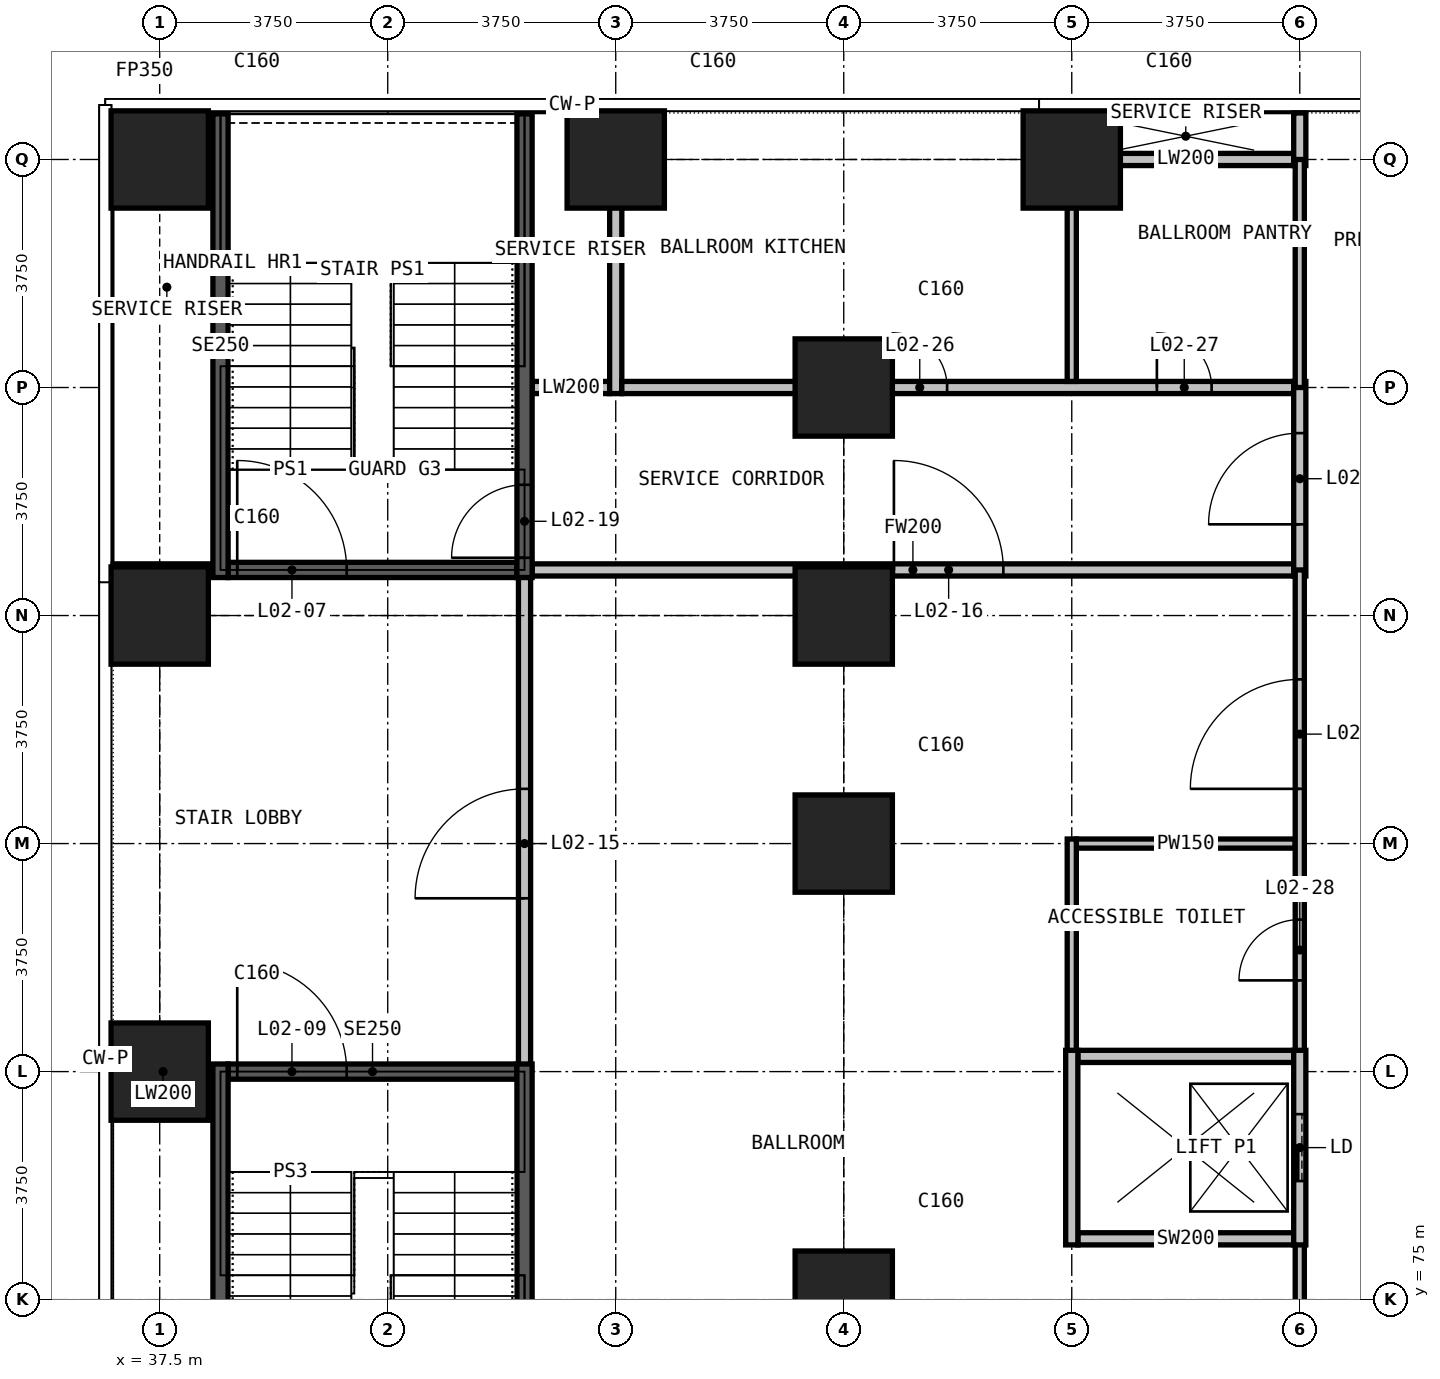
"""IFC4 building model, lengths in metres.
Left out: names, types, materials, properties, quantities, classifications, styles, units other than length and angle.
Written with IfcOpenShell. Run it as: python <this file> out.ifc"""

import sys

from ifc_helpers import new_model, si_unit, direction, frame, frame_2d, origin, origin_2d, place, context, subcontext, project, spatial, rectangle, extrude, element, fill, save


model = new_model("IFC4")
c1 = context("Model", 3, precision=1e-05, world=origin(), true_north=direction((0.0, 1.0)))
c2 = subcontext(c1, "Body", "Model", "MODEL_VIEW")
j1 = project(units=[si_unit("LENGTHUNIT", "METRE"), si_unit("PLANEANGLEUNIT", "RADIAN")], contexts=[c1])
p1 = place(None, origin())
s1 = spatial("IfcSite", under=j1, at=p1, CompositionType="ELEMENT")
p2 = place(p1, origin())
s2 = spatial("IfcBuilding", under=s1, at=p2, CompositionType="ELEMENT")
p3 = place(p2, frame((0.0, 0.0, 16.5)))
s3 = spatial("IfcBuildingStorey", under=s2, at=p3, CompositionType="ELEMENT", Elevation=16.5)
for number, where, z_axis, x_axis in (
    (1, (37.5, 78.75, 0.0), (0.0, 0.0, 1.0), (1.0, 0.0, 0.0)),
    (2, (37.5, 86.25, 0.0), (0.0, 0.0, 1.0), (1.0, 0.0, 0.0)),
    (3, (37.5, 93.75, 0.0), (0.0, 0.0, 1.0), (1.0, 0.0, 0.0)),
    (4, (45.0, 93.75, 0.0), (0.0, 0.0, 1.0), (1.0, 0.0, 0.0)),
    (5, (48.75, 75.0, 0.0), (0.0, 0.0, 1.0), (1.0, 0.0, 0.0)),
    (6, (48.75, 82.5, 0.0), (0.0, 0.0, 1.0), (1.0, 0.0, 0.0)),
    (7, (48.75, 86.25, 0.0), (0.0, 0.0, 1.0), (1.0, 0.0, 0.0)),
    (8, (48.75, 90.0, 0.0), (0.0, 0.0, 1.0), (1.0, 0.0, 0.0)),
    (9, (52.5, 93.75, 0.0), (0.0, 0.0, 1.0), (1.0, 0.0, 0.0)),
):
    element("IfcColumn", number, at=place(p3, frame(where, z_axis=z_axis, x_axis=x_axis)), inside=s3, PredefinedType="COLUMN", context=c2, shape_type="SweptSolid", body=[
        extrude(rectangle(XDim=1.6, YDim=1.6, at=origin_2d()), origin(), (0.0, 0.0, 1.0), 7.5),
    ])
for number, where, z_axis, x_axis in (
    (10, (36.735, 78.75, 0.0), (0.0, 0.0, 1.0), (1.0, 0.0, 0.0)),
    (11, (36.735, 87.0, 0.0), (0.0, 0.0, 1.0), (1.0, 0.0, 0.0)),
):
    element("IfcWall", number, at=place(p3, frame(where, z_axis=z_axis, x_axis=x_axis)), inside=s3, PredefinedType="PARTITIONING", context=c2, shape_type="SweptSolid", body=[
        extrude(rectangle(XDim=1.64, YDim=0.2, at=frame_2d((0.82, 0.0))), origin(), (0.0, 0.0, 1.0), 7.15),
    ])
p4 = place(p3, frame((43.625, 90.0, 0.0), z_axis=(0.0, 0.0, 1.0), x_axis=(1.0, 0.0, 0.0)))
e12 = element("IfcWall", 12, at=p4, inside=s3, PredefinedType="PARTITIONING", context=c2, shape_type="SweptSolid", body=[
    extrude(rectangle(XDim=1.275, YDim=0.2, at=frame_2d((0.637, 0.0))), origin(), (0.0, 0.0, 1.0), 7.15),
])
p5 = place(p3, frame((52.6, 93.75, 0.0), z_axis=(0.0, 0.0, 1.0), x_axis=(1.0, 0.0, 0.0)))
e13 = element("IfcWall", 13, at=p5, inside=s3, PredefinedType="PARTITIONING", context=c2, shape_type="SweptSolid", body=[
    extrude(rectangle(XDim=3.55, YDim=0.2, at=frame_2d((1.775, 0.0))), origin(), (0.0, 0.0, 1.0), 7.15),
])
p6 = place(p3, frame((43.5, 78.625, 0.0), z_axis=(0.0, 0.0, 1.0), x_axis=(0.0, 1.0, 0.0)))
e14 = element("IfcWall", 14, at=p6, inside=s3, PredefinedType="PARTITIONING", context=c2, shape_type="SweptSolid", body=[
    extrude(rectangle(XDim=8.5, YDim=0.2, at=frame_2d((4.25, 0.0))), origin(), (0.0, 0.0, 1.0), 7.15),
])
p7 = place(p6, frame((2.975, 0.0, 0.0)))
e15 = element("IfcOpeningElement", 15, at=p7, cuts=e14, PredefinedType="OPENING", context=c2, shape_type="SweptSolid", body=[
    extrude(rectangle(XDim=1.8, YDim=2.2, at=frame_2d((0.9, 1.1))), frame((0.0, 0.11, 0.0), z_axis=(0.0, -1.0, 0.0), x_axis=(1.0, 0.0, 0.0)), (0.0, 0.0, 1.0), 0.22),
])
p8 = place(p3, frame((45.0, 89.9, 0.0), z_axis=(0.0, 0.0, 1.0), x_axis=(0.0, 1.0, 0.0)))
e16 = element("IfcWall", 16, at=p8, inside=s3, PredefinedType="PARTITIONING", context=c2, shape_type="SweptSolid", body=[
    extrude(rectangle(XDim=4.615, YDim=0.2, at=frame_2d((2.308, 0.0))), origin(), (0.0, 0.0, 1.0), 7.15),
])
for number, where, z_axis, x_axis in (
    (17, (52.5, 93.65, 0.0), (0.0, 0.0, 1.0), (0.0, 1.0, 0.0)),
    (18, (56.25, 93.65, 0.0), (0.0, 0.0, 1.0), (0.0, 1.0, 0.0)),
):
    element("IfcWall", number, at=place(p3, frame(where, z_axis=z_axis, x_axis=x_axis)), inside=s3, PredefinedType="PARTITIONING", context=c2, shape_type="SweptSolid", body=[
        extrude(rectangle(XDim=0.865, YDim=0.2, at=frame_2d((0.433, 0.0))), origin(), (0.0, 0.0, 1.0), 7.15),
    ])
p9 = place(p3, frame((43.625, 87.0, 0.0), z_axis=(0.0, 0.0, 1.0), x_axis=(1.0, 0.0, 0.0)))
e19 = element("IfcWall", 19, at=p9, inside=s3, PredefinedType="PARTITIONING", context=c2, shape_type="SweptSolid", body=[
    extrude(rectangle(XDim=12.525, YDim=0.2, at=frame_2d((6.262, 0.0))), origin(), (0.0, 0.0, 1.0), 7.15),
])
p10 = place(p9, frame((5.95, 0.0, 0.0)))
e20 = element("IfcOpeningElement", 20, at=p10, cuts=e19, PredefinedType="OPENING", context=c2, shape_type="SweptSolid", body=[
    extrude(rectangle(XDim=1.8, YDim=2.2, at=frame_2d((0.9, 1.1))), frame((0.0, 0.11, 0.0), z_axis=(0.0, -1.0, 0.0), x_axis=(1.0, 0.0, 0.0)), (0.0, 0.0, 1.0), 0.22),
])
p11 = place(p3, frame((45.1, 90.0, 0.0), z_axis=(0.0, 0.0, 1.0), x_axis=(1.0, 0.0, 0.0)))
e21 = element("IfcWall", 21, at=p11, inside=s3, PredefinedType="PARTITIONING", context=c2, shape_type="SweptSolid", body=[
    extrude(rectangle(XDim=11.05, YDim=0.2, at=frame_2d((5.525, 0.0))), origin(), (0.0, 0.0, 1.0), 7.15),
])
p12 = place(p11, frame((4.45, 0.0, 0.0)))
e22 = element("IfcOpeningElement", 22, at=p12, cuts=e21, PredefinedType="OPENING", context=c2, shape_type="SweptSolid", body=[
    extrude(rectangle(XDim=0.9, YDim=2.2, at=frame_2d((0.45, 1.1))), frame((0.0, 0.11, 0.0), z_axis=(0.0, -1.0, 0.0), x_axis=(1.0, 0.0, 0.0)), (0.0, 0.0, 1.0), 0.22),
])
p13 = place(p11, frame((8.8, 0.0, 0.0)))
e23 = element("IfcOpeningElement", 23, at=p13, cuts=e21, PredefinedType="OPENING", context=c2, shape_type="SweptSolid", body=[
    extrude(rectangle(XDim=0.9, YDim=2.2, at=frame_2d((0.45, 1.1))), frame((0.0, 0.11, 0.0), z_axis=(0.0, -1.0, 0.0), x_axis=(1.0, 0.0, 0.0)), (0.0, 0.0, 1.0), 0.22),
])
p14 = place(p3, frame((56.25, 86.9, 0.0), z_axis=(0.0, 0.0, 1.0), x_axis=(0.0, 1.0, 0.0)))
e24 = element("IfcWall", 24, at=p14, inside=s3, PredefinedType="PARTITIONING", context=c2, shape_type="SweptSolid", body=[
    extrude(rectangle(XDim=3.2, YDim=0.2, at=frame_2d((1.6, 0.0))), origin(), (0.0, 0.0, 1.0), 7.15),
])
p15 = place(p14, frame((0.85, 0.0, 0.0)))
e25 = element("IfcOpeningElement", 25, at=p15, cuts=e24, PredefinedType="OPENING", context=c2, shape_type="SweptSolid", body=[
    extrude(rectangle(XDim=1.5, YDim=2.2, at=frame_2d((0.75, 1.1))), frame((0.0, 0.11, 0.0), z_axis=(0.0, -1.0, 0.0), x_axis=(1.0, 0.0, 0.0)), (0.0, 0.0, 1.0), 0.22),
])
p16 = place(p3, frame((52.575, 82.5, 0.0), z_axis=(0.0, 0.0, 1.0), x_axis=(1.0, 0.0, 0.0)))
e26 = element("IfcWall", 26, at=p16, inside=s3, PredefinedType="PARTITIONING", context=c2, shape_type="SweptSolid", body=[
    extrude(rectangle(XDim=3.6, YDim=0.15, at=frame_2d((1.8, 0.0))), origin(), (0.0, 0.0, 1.0), 7.15),
])
p17 = place(p3, frame((52.5, 78.9, 0.0), z_axis=(0.0, 0.0, 1.0), x_axis=(0.0, 1.0, 0.0)))
e27 = element("IfcWall", 27, at=p17, inside=s3, PredefinedType="PARTITIONING", context=c2, shape_type="SweptSolid", body=[
    extrude(rectangle(XDim=3.675, YDim=0.15, at=frame_2d((1.837, 0.0))), origin(), (0.0, 0.0, 1.0), 7.15),
])
p18 = place(p3, frame((52.5, 90.1, 0.0), z_axis=(0.0, 0.0, 1.0), x_axis=(0.0, 1.0, 0.0)))
e28 = element("IfcWall", 28, at=p18, inside=s3, PredefinedType="PARTITIONING", context=c2, shape_type="SweptSolid", body=[
    extrude(rectangle(XDim=3.65, YDim=0.15, at=frame_2d((1.825, 0.0))), origin(), (0.0, 0.0, 1.0), 7.15),
])
p19 = place(p3, frame((56.25, 71.25, 0.0), z_axis=(0.0, 0.0, 1.0), x_axis=(0.0, 1.0, 0.0)))
e29 = element("IfcWall", 29, at=p19, inside=s3, PredefinedType="PARTITIONING", context=c2, shape_type="SweptSolid", body=[
    extrude(rectangle(XDim=4.85, YDim=0.15, at=frame_2d((2.425, 0.0))), origin(), (0.0, 0.0, 1.0), 7.15),
])
p20 = place(p19, frame((0.85, 0.0, 0.0)))
e30 = element("IfcOpeningElement", 30, at=p20, cuts=e29, PredefinedType="OPENING", context=c2, shape_type="SweptSolid", body=[
    extrude(rectangle(XDim=1.8, YDim=2.2, at=frame_2d((0.9, 1.1))), frame((0.0, 0.085, 0.0), z_axis=(0.0, -1.0, 0.0), x_axis=(1.0, 0.0, 0.0)), (0.0, 0.0, 1.0), 0.17),
])
p21 = place(p3, frame((56.25, 78.9, 0.0), z_axis=(0.0, 0.0, 1.0), x_axis=(0.0, 1.0, 0.0)))
e31 = element("IfcWall", 31, at=p21, inside=s3, PredefinedType="PARTITIONING", context=c2, shape_type="SweptSolid", body=[
    extrude(rectangle(XDim=8.1, YDim=0.15, at=frame_2d((4.05, 0.0))), origin(), (0.0, 0.0, 1.0), 7.15),
])
p22 = place(p21, frame((4.5, 0.0, 0.0)))
e32 = element("IfcOpeningElement", 32, at=p22, cuts=e31, PredefinedType="OPENING", context=c2, shape_type="SweptSolid", body=[
    extrude(rectangle(XDim=1.8, YDim=2.2, at=frame_2d((0.9, 1.1))), frame((0.0, 0.085, 0.0), z_axis=(0.0, -1.0, 0.0), x_axis=(1.0, 0.0, 0.0)), (0.0, 0.0, 1.0), 0.17),
])
p23 = place(p21, frame((1.35, 0.0, 0.0)))
e33 = element("IfcOpeningElement", 33, at=p23, cuts=e31, PredefinedType="OPENING", context=c2, shape_type="SweptSolid", body=[
    extrude(rectangle(XDim=1.0, YDim=2.2, at=frame_2d((0.5, 1.1))), frame((0.0, 0.085, 0.0), z_axis=(0.0, -1.0, 0.0), x_axis=(1.0, 0.0, 0.0)), (0.0, 0.0, 1.0), 0.17),
])
p24 = place(p3, frame((56.25, 90.0, 0.0), z_axis=(0.0, 0.0, 1.0), x_axis=(0.0, 1.0, 0.0)))
e34 = element("IfcWall", 34, at=p24, inside=s3, PredefinedType="PARTITIONING", context=c2, shape_type="SweptSolid", body=[
    extrude(rectangle(XDim=3.75, YDim=0.15, at=frame_2d((1.875, 0.0))), origin(), (0.0, 0.0, 1.0), 7.15),
])
for number, where, z_axis, x_axis in (
    (35, (52.6, 76.0, 0.0), (0.0, 0.0, 1.0), (1.0, 0.0, 0.0)),
    (36, (52.6, 79.0, 0.0), (0.0, 0.0, 1.0), (1.0, 0.0, 0.0)),
):
    element("IfcWall", number, at=place(p3, frame(where, z_axis=z_axis, x_axis=x_axis)), inside=s3, PredefinedType="PARTITIONING", context=c2, shape_type="SweptSolid", body=[
        extrude(rectangle(XDim=3.55, YDim=0.2, at=frame_2d((1.775, 0.0))), origin(), (0.0, 0.0, 1.0), 7.15),
    ])
p25 = place(p3, frame((52.5, 75.9, 0.0), z_axis=(0.0, 0.0, 1.0), x_axis=(0.0, 1.0, 0.0)))
e37 = element("IfcWall", 37, at=p25, inside=s3, PredefinedType="PARTITIONING", context=c2, shape_type="SweptSolid", body=[
    extrude(rectangle(XDim=3.2, YDim=0.2, at=frame_2d((1.6, 0.0))), origin(), (0.0, 0.0, 1.0), 7.15),
])
p26 = place(p3, frame((56.25, 75.9, 0.0), z_axis=(0.0, 0.0, 1.0), x_axis=(0.0, 1.0, 0.0)))
e38 = element("IfcWall", 38, at=p26, inside=s3, PredefinedType="PARTITIONING", context=c2, shape_type="SweptSolid", body=[
    extrude(rectangle(XDim=3.2, YDim=0.2, at=frame_2d((1.6, 0.0))), origin(), (0.0, 0.0, 1.0), 7.15),
])
p27 = place(p26, frame((1.05, 0.0, 0.0)))
e39 = element("IfcOpeningElement", 39, at=p27, cuts=e38, PredefinedType="OPENING", context=c2, shape_type="SweptSolid", body=[
    extrude(rectangle(XDim=1.1, YDim=2.2, at=frame_2d((0.55, 1.1))), frame((0.0, 0.11, 0.0), z_axis=(0.0, -1.0, 0.0), x_axis=(1.0, 0.0, 0.0)), (0.0, 0.0, 1.0), 0.22),
])
p28 = place(p3, frame((38.625, 78.75, 0.0), z_axis=(0.0, 0.0, 1.0), x_axis=(1.0, 0.0, 0.0)))
e40 = element("IfcWall", 40, at=p28, inside=s3, PredefinedType="PARTITIONING", context=c2, shape_type="SweptSolid", body=[
    extrude(rectangle(XDim=4.75, YDim=0.25, at=frame_2d((2.375, 0.0))), origin(), (0.0, 0.0, 1.0), 7.15),
])
p29 = place(p28, frame((0.15, 0.0, 0.0)))
e41 = element("IfcOpeningElement", 41, at=p29, cuts=e40, PredefinedType="OPENING", context=c2, shape_type="SweptSolid", body=[
    extrude(rectangle(XDim=1.8, YDim=2.2, at=frame_2d((0.9, 1.1))), frame((0.0, 0.135, 0.0), z_axis=(0.0, -1.0, 0.0), x_axis=(1.0, 0.0, 0.0)), (0.0, 0.0, 1.0), 0.27),
])
p30 = place(p3, frame((38.625, 87.0, 0.0), z_axis=(0.0, 0.0, 1.0), x_axis=(1.0, 0.0, 0.0)))
e42 = element("IfcWall", 42, at=p30, inside=s3, PredefinedType="PARTITIONING", context=c2, shape_type="SweptSolid", body=[
    extrude(rectangle(XDim=4.75, YDim=0.25, at=frame_2d((2.375, 0.0))), origin(), (0.0, 0.0, 1.0), 7.15),
])
p31 = place(p30, frame((0.15, 0.0, 0.0)))
e43 = element("IfcOpeningElement", 43, at=p31, cuts=e42, PredefinedType="OPENING", context=c2, shape_type="SweptSolid", body=[
    extrude(rectangle(XDim=1.8, YDim=2.2, at=frame_2d((0.9, 1.1))), frame((0.0, 0.135, 0.0), z_axis=(0.0, -1.0, 0.0), x_axis=(1.0, 0.0, 0.0)), (0.0, 0.0, 1.0), 0.27),
])
for number, where, z_axis, x_axis in (
    (44, (38.5, 71.25, 0.0), (0.0, 0.0, 1.0), (0.0, 1.0, 0.0)),
    (45, (38.5, 86.875, 0.0), (0.0, 0.0, 1.0), (0.0, 1.0, 0.0)),
    (46, (43.5, 71.25, 0.0), (0.0, 0.0, 1.0), (0.0, 1.0, 0.0)),
):
    element("IfcWall", number, at=place(p3, frame(where, z_axis=z_axis, x_axis=x_axis)), inside=s3, PredefinedType="PARTITIONING", context=c2, shape_type="SweptSolid", body=[
        extrude(rectangle(XDim=7.625, YDim=0.25, at=frame_2d((3.812, 0.0))), origin(), (0.0, 0.0, 1.0), 7.15),
    ])
p32 = place(p3, frame((43.5, 86.875, 0.0), z_axis=(0.0, 0.0, 1.0), x_axis=(0.0, 1.0, 0.0)))
e47 = element("IfcWall", 47, at=p32, inside=s3, PredefinedType="PARTITIONING", context=c2, shape_type="SweptSolid", body=[
    extrude(rectangle(XDim=7.625, YDim=0.25, at=frame_2d((3.812, 0.0))), origin(), (0.0, 0.0, 1.0), 7.15),
])
p33 = place(p32, frame((0.325, 0.0, 0.0)))
e48 = element("IfcOpeningElement", 48, at=p33, cuts=e47, PredefinedType="OPENING", context=c2, shape_type="SweptSolid", body=[
    extrude(rectangle(XDim=1.2, YDim=2.2, at=frame_2d((0.6, 1.1))), frame((0.0, 0.135, 0.0), z_axis=(0.0, -1.0, 0.0), x_axis=(1.0, 0.0, 0.0)), (0.0, 0.0, 1.0), 0.27),
])
p34 = place(p15, origin())
e49 = element("IfcDoor", 49, at=p34, inside=s3, OperationType="DOUBLE_DOOR_SINGLE_SWING", PredefinedType="DOOR", context=c2, shape_type="SweptSolid", body=[
    extrude(rectangle(XDim=1.5, YDim=2.2, at=frame_2d((0.75, 1.1))), frame((0.0, 0.025, 0.0), z_axis=(0.0, -1.0, 0.0), x_axis=(1.0, 0.0, 0.0)), (0.0, 0.0, 1.0), 0.05),
])
fill(e25, e49)
p35 = place(p31, origin())
e50 = element("IfcDoor", 50, at=p35, inside=s3, OperationType="DOUBLE_DOOR_SINGLE_SWING", PredefinedType="DOOR", context=c2, shape_type="SweptSolid", body=[
    extrude(rectangle(XDim=1.8, YDim=2.2, at=frame_2d((0.9, 1.1))), frame((0.0, 0.025, 0.0), z_axis=(0.0, -1.0, 0.0), x_axis=(1.0, 0.0, 0.0)), (0.0, 0.0, 1.0), 0.05),
])
fill(e43, e50)
p36 = place(p29, origin())
e51 = element("IfcDoor", 51, at=p36, inside=s3, OperationType="DOUBLE_DOOR_SINGLE_SWING", PredefinedType="DOOR", context=c2, shape_type="SweptSolid", body=[
    extrude(rectangle(XDim=1.8, YDim=2.2, at=frame_2d((0.9, 1.1))), frame((0.0, 0.025, 0.0), z_axis=(0.0, -1.0, 0.0), x_axis=(1.0, 0.0, 0.0)), (0.0, 0.0, 1.0), 0.05),
])
fill(e41, e51)
p37 = place(p27, origin())
e52 = element("IfcDoor", 52, at=p37, inside=s3, OperationType="DOUBLE_DOOR_SLIDING", PredefinedType="DOOR", context=c2, shape_type="SweptSolid", body=[
    extrude(rectangle(XDim=1.1, YDim=2.2, at=frame_2d((0.55, 1.1))), frame((0.0, 0.025, 0.0), z_axis=(0.0, -1.0, 0.0), x_axis=(1.0, 0.0, 0.0)), (0.0, 0.0, 1.0), 0.05),
])
fill(e39, e52)
p38 = place(p22, origin())
e53 = element("IfcDoor", 53, at=p38, inside=s3, OperationType="DOUBLE_DOOR_SINGLE_SWING", PredefinedType="DOOR", context=c2, shape_type="SweptSolid", body=[
    extrude(rectangle(XDim=1.8, YDim=2.2, at=frame_2d((0.9, 1.1))), frame((0.0, 0.025, 0.0), z_axis=(0.0, -1.0, 0.0), x_axis=(1.0, 0.0, 0.0)), (0.0, 0.0, 1.0), 0.05),
])
fill(e32, e53)
p39 = place(p7, origin())
e54 = element("IfcDoor", 54, at=p39, inside=s3, OperationType="DOUBLE_DOOR_SINGLE_SWING", PredefinedType="DOOR", context=c2, shape_type="SweptSolid", body=[
    extrude(rectangle(XDim=1.8, YDim=2.2, at=frame_2d((0.9, 1.1))), frame((0.0, 0.025, 0.0), z_axis=(0.0, -1.0, 0.0), x_axis=(1.0, 0.0, 0.0)), (0.0, 0.0, 1.0), 0.05),
])
fill(e15, e54)
p40 = place(p10, origin())
e55 = element("IfcDoor", 55, at=p40, inside=s3, OperationType="DOUBLE_DOOR_SINGLE_SWING", PredefinedType="DOOR", context=c2, shape_type="SweptSolid", body=[
    extrude(rectangle(XDim=1.8, YDim=2.2, at=frame_2d((0.9, 1.1))), frame((0.0, 0.025, 0.0), z_axis=(0.0, -1.0, 0.0), x_axis=(1.0, 0.0, 0.0)), (0.0, 0.0, 1.0), 0.05),
])
fill(e20, e55)
p41 = place(p33, origin())
e56 = element("IfcDoor", 56, at=p41, inside=s3, OperationType="SINGLE_SWING_RIGHT", PredefinedType="DOOR", context=c2, shape_type="SweptSolid", body=[
    extrude(rectangle(XDim=1.2, YDim=2.2, at=frame_2d((0.6, 1.1))), frame((0.0, 0.025, 0.0), z_axis=(0.0, -1.0, 0.0), x_axis=(1.0, 0.0, 0.0)), (0.0, 0.0, 1.0), 0.05),
])
fill(e48, e56)
p42 = place(p12, origin())
e57 = element("IfcDoor", 57, at=p42, inside=s3, OperationType="SINGLE_SWING_RIGHT", PredefinedType="DOOR", context=c2, shape_type="SweptSolid", body=[
    extrude(rectangle(XDim=0.9, YDim=2.2, at=frame_2d((0.45, 1.1))), frame((0.0, 0.025, 0.0), z_axis=(0.0, -1.0, 0.0), x_axis=(1.0, 0.0, 0.0)), (0.0, 0.0, 1.0), 0.05),
])
fill(e22, e57)
p43 = place(p13, origin())
e58 = element("IfcDoor", 58, at=p43, inside=s3, OperationType="SINGLE_SWING_RIGHT", PredefinedType="DOOR", context=c2, shape_type="SweptSolid", body=[
    extrude(rectangle(XDim=0.9, YDim=2.2, at=frame_2d((0.45, 1.1))), frame((0.0, 0.025, 0.0), z_axis=(0.0, -1.0, 0.0), x_axis=(1.0, 0.0, 0.0)), (0.0, 0.0, 1.0), 0.05),
])
fill(e23, e58)
p44 = place(p23, origin())
e59 = element("IfcDoor", 59, at=p44, inside=s3, OperationType="SINGLE_SWING_RIGHT", PredefinedType="DOOR", context=c2, shape_type="SweptSolid", body=[
    extrude(rectangle(XDim=1.0, YDim=2.2, at=frame_2d((0.5, 1.1))), frame((0.0, 0.025, 0.0), z_axis=(0.0, -1.0, 0.0), x_axis=(1.0, 0.0, 0.0)), (0.0, 0.0, 1.0), 0.05),
])
fill(e33, e59)
save(model, sys.argv[1])
